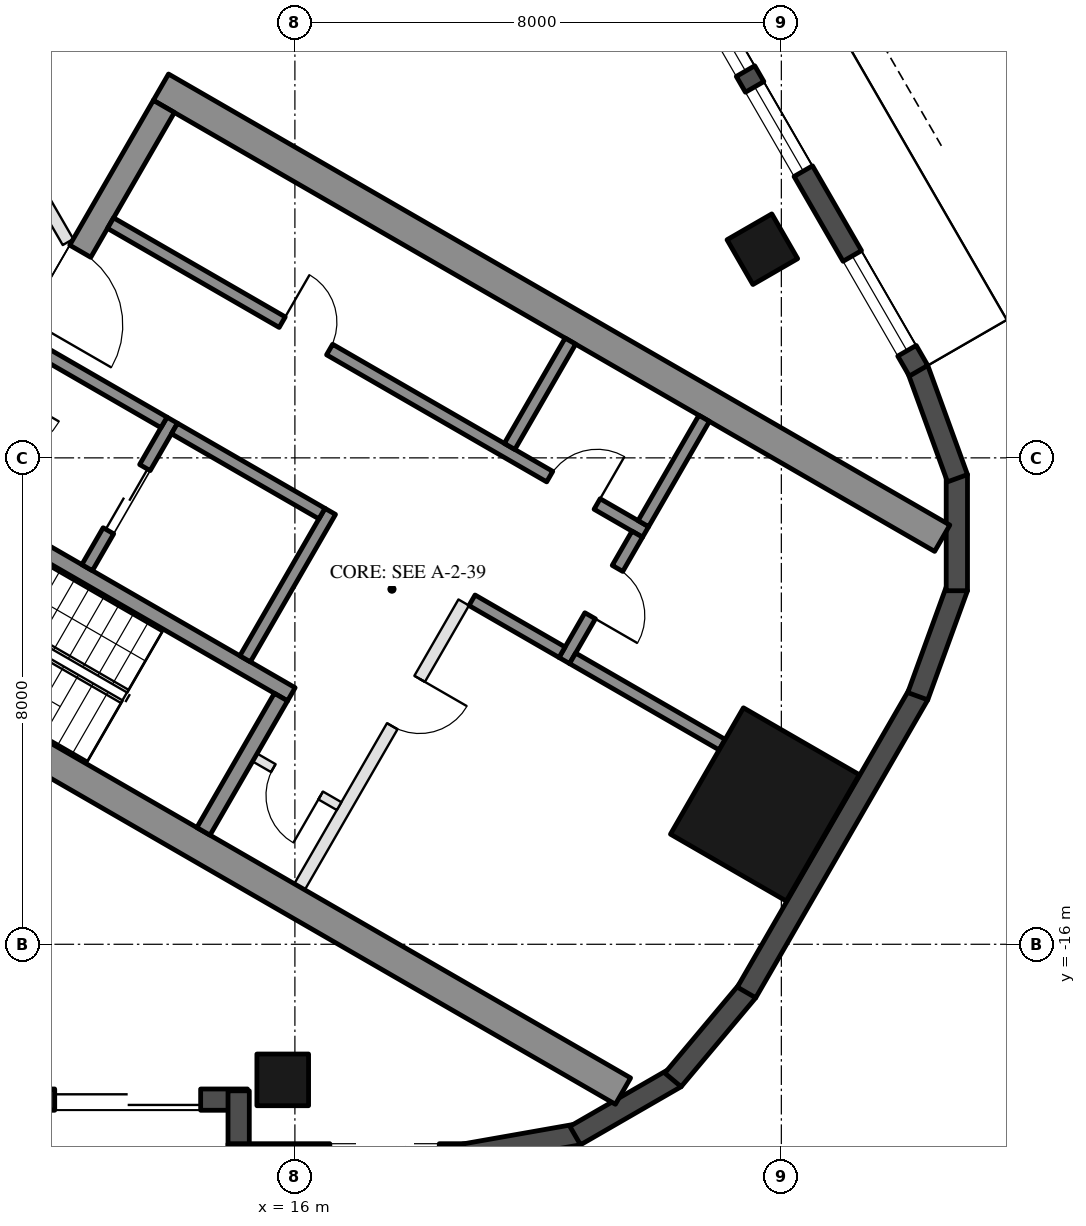
"""IFC4 building model, lengths in metres.
Left out: names, types, materials, properties, quantities, classifications, styles, units other than length and angle.
Written with IfcOpenShell. Run it as: python <this file> out.ifc"""

import sys

from ifc_helpers import new_model, si_unit, direction, frame, frame_2d, origin, origin_2d, place, context, subcontext, project, spatial, rectangle, hollow_rectangle, extrude, element, fill, save


model = new_model("IFC4")
c1 = context("Model", 3, precision=1e-05, world=origin(), true_north=direction((0.0, 1.0)))
c2 = subcontext(c1, "Body", "Model", "MODEL_VIEW")
j1 = project(units=[si_unit("LENGTHUNIT", "METRE"), si_unit("PLANEANGLEUNIT", "RADIAN")], contexts=[c1])
p1 = place(None, origin())
s1 = spatial("IfcSite", under=j1, at=p1, CompositionType="ELEMENT")
p2 = place(p1, origin())
s2 = spatial("IfcBuilding", under=s1, at=p2, CompositionType="ELEMENT")
p3 = place(p2, frame((0.0, 0.0, 168.8)))
s3 = spatial("IfcBuildingStorey", under=s2, at=p3, CompositionType="ELEMENT", Elevation=168.8)
for number, where, z_axis, x_axis in (
    (1, (15.8, -18.23, 0.0), (0.0, 0.0, 1.0), (-1.0, 0.0, 0.0)),
    (2, (23.688, -4.568, 0.0), (0.0, 0.0, 1.0), (-0.5, 0.866, 0.0)),
):
    element("IfcColumn", number, at=place(p3, frame(where, z_axis=z_axis, x_axis=x_axis)), inside=s3, PredefinedType="COLUMN", context=c2, shape_type="SweptSolid", body=[
        extrude(hollow_rectangle(XDim=0.85, YDim=0.85, WallThickness=0.04, at=origin_2d()), origin(), (0.0, 0.0, 1.0), 3.7),
    ])
p4 = place(p3, frame((23.729, -13.7, 0.0), z_axis=(0.0, 0.0, 1.0), x_axis=(0.5, 0.866025403784, 0.0)))
e3 = element("IfcColumn", 3, at=p4, inside=s3, PredefinedType="COLUMN", context=c2, shape_type="SweptSolid", body=[
    extrude(hollow_rectangle(XDim=2.4, YDim=2.2, WallThickness=0.06, at=origin_2d()), origin(), (0.0, 0.0, 1.0), 3.7),
])
p5 = place(p3, frame((8.48, -18.555, 0.0), z_axis=(0.0, 0.0, 1.0), x_axis=(1.0, 0.0, 0.0)))
e4 = element("IfcWall", 4, at=p5, inside=s3, PredefinedType="SOLIDWALL", context=c2, shape_type="SweptSolid", body=[
    extrude(rectangle(XDim=6.74, YDim=0.35, at=frame_2d((3.37, 0.0))), origin(), (0.0, 0.0, 1.0), 3.55),
])
p6 = place(p5, frame((3.57, 0.0, 0.0)))
e5 = element("IfcOpeningElement", 5, at=p6, cuts=e4, PredefinedType="OPENING", context=c2, shape_type="SweptSolid", body=[
    extrude(rectangle(XDim=2.4, YDim=2.4, at=frame_2d((1.2, 1.2))), frame((0.0, 0.185, 0.0), z_axis=(0.0, -1.0, 0.0), x_axis=(1.0, 0.0, 0.0)), (0.0, 0.0, 1.0), 0.37),
])
p7 = place(p5, frame((0.32, 0.0, 0.3)))
e6 = element("IfcOpeningElement", 6, at=p7, cuts=e4, PredefinedType="OPENING", context=c2, shape_type="SweptSolid", body=[
    extrude(rectangle(XDim=2.9, YDim=2.65, at=frame_2d((1.45, 1.325))), frame((0.0, 0.185, 0.0), z_axis=(0.0, -1.0, 0.0), x_axis=(1.0, 0.0, 0.0)), (0.0, 0.0, 1.0), 0.37),
])
p8 = place(p3, frame((15.075, -18.41, 0.0), z_axis=(0.0, 0.0, 1.0), x_axis=(0.0, -1.0, 0.0)))
e7 = element("IfcWall", 7, at=p8, inside=s3, PredefinedType="SOLIDWALL", context=c2, shape_type="SweptSolid", body=[
    extrude(rectangle(XDim=1.22, YDim=0.35, at=frame_2d((0.61, 0.0))), origin(), (0.0, 0.0, 1.0), 3.55),
])
p9 = place(p3, frame((14.9, -19.455, 0.0), z_axis=(0.0, 0.0, 1.0), x_axis=(1.0, 0.0, 0.0)))
e8 = element("IfcWall", 8, at=p9, inside=s3, PredefinedType="SOLIDWALL", context=c2, shape_type="SweptSolid", body=[
    extrude(rectangle(XDim=3.916, YDim=0.35, at=frame_2d((1.958, 0.0))), origin(), (0.0, 0.0, 1.0), 3.55),
])
p10 = place(p9, frame((1.675, 0.0, 0.3)))
e9 = element("IfcOpeningElement", 9, at=p10, cuts=e8, PredefinedType="OPENING", context=c2, shape_type="SweptSolid", body=[
    extrude(rectangle(XDim=1.8, YDim=2.65, at=frame_2d((0.9, 1.325))), frame((0.0, 0.185, 0.0), z_axis=(0.0, -1.0, 0.0), x_axis=(1.0, 0.0, 0.0)), (0.0, 0.0, 1.0), 0.37),
])
p11 = place(p3, frame((18.785, -19.458, 0.0), z_axis=(0.0, 0.0, 1.0), x_axis=(0.984798995425, 0.173697837091, 0.0)))
e10 = element("IfcWall", 10, at=p11, inside=s3, PredefinedType="SOLIDWALL", context=c2, shape_type="SweptSolid", body=[
    extrude(rectangle(XDim=1.91, YDim=0.35, at=frame_2d((0.955, 0.0))), origin(), (0.0, 0.0, 1.0), 3.55),
])
for number, where, z_axis, x_axis in (
    (11, (20.61, -19.147, 0.0), (0.0, 0.0, 1.0), (0.866, 0.5, 0.0)),
    (12, (22.217, -18.231, 0.0), (0.0, 0.0, 1.0), (0.643, 0.766, 0.0)),
):
    element("IfcWall", number, at=place(p3, frame(where, z_axis=z_axis, x_axis=x_axis)), inside=s3, PredefinedType="SOLIDWALL", context=c2, shape_type="SweptSolid", body=[
        extrude(rectangle(XDim=1.91, YDim=0.35, at=frame_2d((0.955, 0.0))), origin(), (0.0, 0.0, 1.0), 3.55),
    ])
p12 = place(p3, frame((23.427, -16.792, 0.0), z_axis=(0.0, 0.0, 1.0), x_axis=(0.500018773155, 0.866014564827, 0.0)))
e13 = element("IfcWall", 13, at=p12, inside=s3, PredefinedType="SOLIDWALL", context=c2, shape_type="SweptSolid", body=[
    extrude(rectangle(XDim=5.658, YDim=0.35, at=frame_2d((2.829, 0.0))), origin(), (0.0, 0.0, 1.0), 3.55),
])
for number, where, z_axis, x_axis in (
    (14, (26.244, -11.92, 0.0), (0.0, 0.0, 1.0), (0.342, 0.94, 0.0)),
    (15, (26.886, -10.185, 0.0), (0.0, 0.0, 1.0), (0.0, 1.0, 0.0)),
    (16, (26.897, -8.335, 0.0), (0.0, 0.0, 1.0), (-0.342, 0.94, 0.0)),
):
    element("IfcWall", number, at=place(p3, frame(where, z_axis=z_axis, x_axis=x_axis)), inside=s3, PredefinedType="SOLIDWALL", context=c2, shape_type="SweptSolid", body=[
        extrude(rectangle(XDim=1.91, YDim=0.35, at=frame_2d((0.955, 0.0))), origin(), (0.0, 0.0, 1.0), 3.55),
    ])
p13 = place(p3, frame((26.257, -6.567, 0.0), z_axis=(0.0, 0.0, 1.0), x_axis=(-0.500023526245, 0.866011820475, 0.0)))
e17 = element("IfcWall", 17, at=p13, inside=s3, PredefinedType="SOLIDWALL", context=c2, shape_type="SweptSolid", body=[
    extrude(rectangle(XDim=11.816, YDim=0.35, at=frame_2d((5.908, 0.0))), origin(), (0.0, 0.0, 1.0), 3.55),
])
p14 = place(p13, frame((0.38, 0.0, 0.3)))
e18 = element("IfcOpeningElement", 18, at=p14, cuts=e17, PredefinedType="OPENING", context=c2, shape_type="SweptSolid", body=[
    extrude(rectangle(XDim=1.8, YDim=2.65, at=frame_2d((0.9, 1.325))), frame((0.0, 0.185, 0.0), z_axis=(0.0, -1.0, 0.0), x_axis=(1.0, 0.0, 0.0)), (0.0, 0.0, 1.0), 0.37),
])
p15 = place(p13, frame((7.741, 0.0, 0.0)))
e19 = element("IfcOpeningElement", 19, at=p15, cuts=e17, PredefinedType="OPENING", context=c2, shape_type="SweptSolid", body=[
    extrude(rectangle(XDim=2.4, YDim=2.4, at=frame_2d((1.2, 1.2))), frame((0.0, 0.185, 0.0), z_axis=(0.0, -1.0, 0.0), x_axis=(1.0, 0.0, 0.0)), (0.0, 0.0, 1.0), 0.37),
])
p16 = place(p13, frame((3.791, 0.0, 0.3)))
e20 = element("IfcOpeningElement", 20, at=p16, cuts=e17, PredefinedType="OPENING", context=c2, shape_type="SweptSolid", body=[
    extrude(rectangle(XDim=1.6, YDim=2.65, at=frame_2d((0.8, 1.325))), frame((0.0, 0.185, 0.0), z_axis=(0.0, -1.0, 0.0), x_axis=(1.0, 0.0, 0.0)), (0.0, 0.0, 1.0), 0.37),
])
p17 = place(p13, frame((5.691, 0.0, 0.3)))
e21 = element("IfcOpeningElement", 21, at=p17, cuts=e17, PredefinedType="OPENING", context=c2, shape_type="SweptSolid", body=[
    extrude(rectangle(XDim=1.6, YDim=2.65, at=frame_2d((0.8, 1.325))), frame((0.0, 0.185, 0.0), z_axis=(0.0, -1.0, 0.0), x_axis=(1.0, 0.0, 0.0)), (0.0, 0.0, 1.0), 0.37),
])
for number, where, z_axis, x_axis in (
    (22, (8.547, -10.997, 0.0), (0.0, 0.0, 1.0), (0.866, -0.5, 0.0)),
    (23, (13.797, -1.903, 0.0), (0.0, 0.0, 1.0), (0.866, -0.5, 0.0)),
):
    element("IfcWall", number, at=place(p3, frame(where, z_axis=z_axis, x_axis=x_axis)), inside=s3, PredefinedType="SHEAR", context=c2, shape_type="SweptSolid", body=[
        extrude(rectangle(XDim=14.837, YDim=0.5, at=frame_2d((7.418, 0.0))), origin(), (0.0, 0.0, 1.0), 3.5),
    ])
p18 = place(p3, frame((8.845, -10.88, 0.0), z_axis=(0.0, 0.0, 1.0), x_axis=(0.500004234368, 0.866022959057, 0.0)))
e24 = element("IfcWall", 24, at=p18, inside=s3, PredefinedType="SHEAR", context=c2, shape_type="SweptSolid", body=[
    extrude(rectangle(XDim=10.0, YDim=0.4, at=frame_2d((5.0, 0.0))), origin(), (0.0, 0.0, 1.0), 3.5),
])
p19 = place(p18, frame((3.55, 0.0, 0.0)))
e25 = element("IfcOpeningElement", 25, at=p19, cuts=e24, PredefinedType="OPENING", context=c2, shape_type="SweptSolid", body=[
    extrude(rectangle(XDim=1.1, YDim=2.1, at=frame_2d((0.55, 1.05))), frame((0.0, 0.21, 0.0), z_axis=(0.0, -1.0, 0.0), x_axis=(1.0, 0.0, 0.0)), (0.0, 0.0, 1.0), 0.42),
])
p20 = place(p18, frame((5.85, 0.0, 0.0)))
e26 = element("IfcOpeningElement", 26, at=p20, cuts=e24, PredefinedType="OPENING", context=c2, shape_type="SweptSolid", body=[
    extrude(rectangle(XDim=1.4, YDim=2.1, at=frame_2d((0.7, 1.05))), frame((0.0, 0.21, 0.0), z_axis=(0.0, -1.0, 0.0), x_axis=(1.0, 0.0, 0.0)), (0.0, 0.0, 1.0), 0.42),
])
p21 = place(p3, frame((10.356, -8.664, 0.0), z_axis=(0.0, 0.0, 1.0), x_axis=(0.866028629588, -0.499994412703, 0.0)))
e27 = element("IfcWall", 27, at=p21, inside=s3, PredefinedType="SHEAR", context=c2, shape_type="SweptSolid", body=[
    extrude(rectangle(XDim=6.45, YDim=0.25, at=frame_2d((3.225, 0.0))), origin(), (0.0, 0.0, 1.0), 3.5),
])
p22 = place(p21, frame((0.3, 0.0, 0.0)))
e28 = element("IfcOpeningElement", 28, at=p22, cuts=e27, PredefinedType="OPENING", context=c2, shape_type="SweptSolid", body=[
    extrude(rectangle(XDim=1.0, YDim=2.1, at=frame_2d((0.5, 1.05))), frame((0.0, 0.135, 0.0), z_axis=(0.0, -1.0, 0.0), x_axis=(1.0, 0.0, 0.0)), (0.0, 0.0, 1.0), 0.27),
])
p23 = place(p3, frame((14.496, -14.143, 0.0), z_axis=(0.0, 0.0, 1.0), x_axis=(0.500062241894, 0.865989465428, 0.0)))
e29 = element("IfcWall", 29, at=p23, inside=s3, PredefinedType="SHEAR", context=c2, shape_type="SweptSolid", body=[
    extrude(rectangle(XDim=2.55, YDim=0.25, at=frame_2d((1.275, 0.0))), origin(), (0.0, 0.0, 1.0), 3.5),
])
p24 = place(p3, frame((15.181, -11.305, 0.0), z_axis=(0.0, 0.0, 1.0), x_axis=(0.49994636267, 0.866056369097, 0.0)))
e30 = element("IfcWall", 30, at=p24, inside=s3, PredefinedType="SHEAR", context=c2, shape_type="SweptSolid", body=[
    extrude(rectangle(XDim=2.8, YDim=0.2, at=frame_2d((1.4, 0.0))), origin(), (0.0, 0.0, 1.0), 3.5),
])
p25 = place(p3, frame((12.583, -9.805, 0.0), z_axis=(0.0, 0.0, 1.0), x_axis=(0.49994636267, 0.866056369097, 0.0)))
e31 = element("IfcWall", 31, at=p25, inside=s3, PredefinedType="SHEAR", context=c2, shape_type="SweptSolid", body=[
    extrude(rectangle(XDim=2.8, YDim=0.2, at=frame_2d((1.4, 0.0))), origin(), (0.0, 0.0, 1.0), 3.5),
])
p26 = place(p25, frame((0.7, 0.0, 0.0)))
e32 = element("IfcOpeningElement", 32, at=p26, cuts=e31, PredefinedType="OPENING", context=c2, shape_type="SweptSolid", body=[
    extrude(rectangle(XDim=1.2, YDim=2.1, at=frame_2d((0.6, 1.05))), frame((0.0, 0.11, 0.0), z_axis=(0.0, -1.0, 0.0), x_axis=(1.0, 0.0, 0.0)), (0.0, 0.0, 1.0), 0.22),
])
p27 = place(p3, frame((11.768, -6.217, 0.0), z_axis=(0.0, 0.0, 1.0), x_axis=(0.866050077142, -0.499957262057, 0.0)))
e33 = element("IfcWall", 33, at=p27, inside=s3, PredefinedType="SHEAR", context=c2, shape_type="SweptSolid", body=[
    extrude(rectangle(XDim=2.4, YDim=0.2, at=frame_2d((1.2, 0.0))), origin(), (0.0, 0.0, 1.0), 3.5),
])
p28 = place(p3, frame((14.02, -7.517, 0.0), z_axis=(0.0, 0.0, 1.0), x_axis=(0.866034573852, -0.49998411664, 0.0)))
e34 = element("IfcWall", 34, at=p28, inside=s3, PredefinedType="SHEAR", context=c2, shape_type="SweptSolid", body=[
    extrude(rectangle(XDim=2.8, YDim=0.2, at=frame_2d((1.4, 0.0))), origin(), (0.0, 0.0, 1.0), 3.5),
])
p29 = place(p3, frame((12.968, -4.138, 0.0), z_axis=(0.0, 0.0, 1.0), x_axis=(0.866028328073, -0.49999493495, 0.0)))
e35 = element("IfcWall", 35, at=p29, inside=s3, PredefinedType="SHEAR", context=c2, shape_type="SweptSolid", body=[
    extrude(rectangle(XDim=10.16, YDim=0.2, at=frame_2d((5.08, 0.0))), origin(), (0.0, 0.0, 1.0), 3.5),
])
p30 = place(p29, frame((3.26, 0.0, 0.0)))
e36 = element("IfcOpeningElement", 36, at=p30, cuts=e35, PredefinedType="OPENING", context=c2, shape_type="SweptSolid", body=[
    extrude(rectangle(XDim=0.9, YDim=2.1, at=frame_2d((0.45, 1.05))), frame((0.0, 0.11, 0.0), z_axis=(0.0, -1.0, 0.0), x_axis=(1.0, 0.0, 0.0)), (0.0, 0.0, 1.0), 0.22),
])
p31 = place(p29, frame((8.34, 0.0, 0.0)))
e37 = element("IfcOpeningElement", 37, at=p31, cuts=e35, PredefinedType="OPENING", context=c2, shape_type="SweptSolid", body=[
    extrude(rectangle(XDim=0.9, YDim=2.1, at=frame_2d((0.45, 1.05))), frame((0.0, 0.11, 0.0), z_axis=(0.0, -1.0, 0.0), x_axis=(1.0, 0.0, 0.0)), (0.0, 0.0, 1.0), 0.22),
])
p32 = place(p3, frame((20.43, -11.333, 0.0), z_axis=(0.0, 0.0, 1.0), x_axis=(0.500001309137, 0.866024647952, 0.0)))
e38 = element("IfcWall", 38, at=p32, inside=s3, PredefinedType="SHEAR", context=c2, shape_type="SweptSolid", body=[
    extrude(rectangle(XDim=2.4, YDim=0.2, at=frame_2d((1.2, 0.0))), origin(), (0.0, 0.0, 1.0), 3.5),
])
p33 = place(p32, frame((0.85, 0.0, 0.0)))
e39 = element("IfcOpeningElement", 39, at=p33, cuts=e38, PredefinedType="OPENING", context=c2, shape_type="SweptSolid", body=[
    extrude(rectangle(XDim=0.9, YDim=2.1, at=frame_2d((0.45, 1.05))), frame((0.0, 0.11, 0.0), z_axis=(0.0, -1.0, 0.0), x_axis=(1.0, 0.0, 0.0)), (0.0, 0.0, 1.0), 0.22),
])
p34 = place(p3, frame((18.913, -10.342, 0.0), z_axis=(0.0, 0.0, 1.0), x_axis=(0.866038183914, -0.499977863513, 0.0)))
e40 = element("IfcWall", 40, at=p34, inside=s3, PredefinedType="SHEAR", context=c2, shape_type="SweptSolid", body=[
    extrude(rectangle(XDim=1.71, YDim=0.2, at=frame_2d((0.855, 0.0))), origin(), (0.0, 0.0, 1.0), 3.5),
])
for number, where, z_axis, x_axis in (
    (41, (19.531, -7.812, 0.0), (0.0, 0.0, 1.0), (0.5, 0.866, 0.0)),
    (42, (21.73, -9.082, 0.0), (0.0, 0.0, 1.0), (0.5, 0.866, 0.0)),
):
    element("IfcWall", number, at=place(p3, frame(where, z_axis=z_axis, x_axis=x_axis)), inside=s3, PredefinedType="SHEAR", context=c2, shape_type="SweptSolid", body=[
        extrude(rectangle(XDim=2.0, YDim=0.2, at=frame_2d((1.0, 0.0))), origin(), (0.0, 0.0, 1.0), 3.5),
    ])
p35 = place(p3, frame((20.567, -11.297, 0.0), z_axis=(0.0, 0.0, 1.0), x_axis=(0.866055327414, -0.49994816717, 0.0)))
e43 = element("IfcWall", 43, at=p35, inside=s3, PredefinedType="SHEAR", context=c2, shape_type="SweptSolid", body=[
    extrude(rectangle(XDim=2.84, YDim=0.2, at=frame_2d((1.42, 0.0))), origin(), (0.0, 0.0, 1.0), 3.5),
])
p36 = place(p3, frame((16.076, -15.055, 0.0), z_axis=(0.0, 0.0, 1.0), x_axis=(0.499995103361, 0.866028230842, 0.0)))
e44 = element("IfcWall", 44, at=p36, inside=s3, PredefinedType="PARTITIONING", context=c2, shape_type="SweptSolid", body=[
    extrude(rectangle(XDim=5.4, YDim=0.2, at=frame_2d((2.7, 0.0))), origin(), (0.0, 0.0, 1.0), 3.5),
])
p37 = place(p36, frame((3.05, 0.0, 0.0)))
e45 = element("IfcOpeningElement", 45, at=p37, cuts=e44, PredefinedType="OPENING", context=c2, shape_type="SweptSolid", body=[
    extrude(rectangle(XDim=0.9, YDim=2.1, at=frame_2d((0.45, 1.05))), frame((0.0, 0.11, 0.0), z_axis=(0.0, -1.0, 0.0), x_axis=(1.0, 0.0, 0.0)), (0.0, 0.0, 1.0), 0.22),
])
p38 = place(p3, frame((15.342, -12.928, 0.0), z_axis=(0.0, 0.0, 1.0), x_axis=(0.865989903783, -0.500061482766, 0.0)))
e46 = element("IfcWall", 46, at=p38, inside=s3, PredefinedType="PARTITIONING", context=c2, shape_type="SweptSolid", body=[
    extrude(rectangle(XDim=1.6, YDim=0.15, at=frame_2d((0.8, 0.0))), origin(), (0.0, 0.0, 1.0), 3.5),
])
p39 = place(p38, frame((0.35, 0.0, 0.0)))
e47 = element("IfcOpeningElement", 47, at=p39, cuts=e46, PredefinedType="OPENING", context=c2, shape_type="SweptSolid", body=[
    extrude(rectangle(XDim=0.9, YDim=2.1, at=frame_2d((0.45, 1.05))), frame((0.0, 0.085, 0.0), z_axis=(0.0, -1.0, 0.0), x_axis=(1.0, 0.0, 0.0)), (0.0, 0.0, 1.0), 0.17),
])
p40 = place(p3, frame((9.931, -0.401, 0.0), z_axis=(0.0, 0.0, 1.0), x_axis=(0.5000418389, -0.866001246737, 0.0)))
e48 = element("IfcWall", 48, at=p40, inside=s3, PredefinedType="PARTITIONING", context=c2, shape_type="SweptSolid", body=[
    extrude(rectangle(XDim=4.676, YDim=0.2, at=frame_2d((2.338, 0.0))), origin(), (0.0, 0.0, 1.0), 2.95),
])
p41 = place(p40, frame((1.838, 0.0, 0.0)))
e49 = element("IfcOpeningElement", 49, at=p41, cuts=e48, PredefinedType="OPENING", context=c2, shape_type="SweptSolid", body=[
    extrude(rectangle(XDim=1.0, YDim=2.1, at=frame_2d((0.5, 1.05))), frame((0.0, 0.11, 0.0), z_axis=(0.0, -1.0, 0.0), x_axis=(1.0, 0.0, 0.0)), (0.0, 0.0, 1.0), 0.22),
])
p42 = place(p6, frame((2.4, 0.0, 0.0), z_axis=(0.0, 0.0, 1.0), x_axis=(-1.0, 0.0, 0.0)))
e50 = element("IfcDoor", 50, at=p42, inside=s3, OperationType="SLIDING_TO_LEFT", PredefinedType="DOOR", context=c2, shape_type="SweptSolid", body=[
    extrude(rectangle(XDim=2.4, YDim=2.4, at=frame_2d((1.2, 1.2))), frame((0.0, 0.025, 0.0), z_axis=(0.0, -1.0, 0.0), x_axis=(1.0, 0.0, 0.0)), (0.0, 0.0, 1.0), 0.05),
])
fill(e5, e50)
p43 = place(p14, origin())
e51 = element("IfcWindow", 51, at=p43, inside=s3, PartitioningType="SINGLE_PANEL", PredefinedType="WINDOW", context=c2, shape_type="SweptSolid", body=[
    extrude(rectangle(XDim=1.8, YDim=2.65, at=frame_2d((0.9, 1.325))), frame((0.0, 0.03, 0.0), z_axis=(0.0, -1.0, 0.0), x_axis=(1.0, 0.0, 0.0)), (0.0, 0.0, 1.0), 0.06),
])
fill(e18, e51)
p44 = place(p16, origin())
e52 = element("IfcWindow", 52, at=p44, inside=s3, PartitioningType="SINGLE_PANEL", PredefinedType="WINDOW", context=c2, shape_type="SweptSolid", body=[
    extrude(rectangle(XDim=1.6, YDim=2.65, at=frame_2d((0.8, 1.325))), frame((0.0, 0.03, 0.0), z_axis=(0.0, -1.0, 0.0), x_axis=(1.0, 0.0, 0.0)), (0.0, 0.0, 1.0), 0.06),
])
fill(e20, e52)
p45 = place(p17, origin())
e53 = element("IfcWindow", 53, at=p45, inside=s3, PartitioningType="SINGLE_PANEL", PredefinedType="WINDOW", context=c2, shape_type="SweptSolid", body=[
    extrude(rectangle(XDim=1.6, YDim=2.65, at=frame_2d((0.8, 1.325))), frame((0.0, 0.03, 0.0), z_axis=(0.0, -1.0, 0.0), x_axis=(1.0, 0.0, 0.0)), (0.0, 0.0, 1.0), 0.06),
])
fill(e21, e53)
p46 = place(p26, origin())
e54 = element("IfcDoor", 54, at=p46, inside=s3, OperationType="DOUBLE_DOOR_SLIDING", PredefinedType="DOOR", context=c2, shape_type="SweptSolid", body=[
    extrude(rectangle(XDim=1.2, YDim=2.1, at=frame_2d((0.6, 1.05))), frame((0.0, 0.025, 0.0), z_axis=(0.0, -1.0, 0.0), x_axis=(1.0, 0.0, 0.0)), (0.0, 0.0, 1.0), 0.05),
])
fill(e32, e54)
p47 = place(p39, frame((0.9, 0.0, 0.0), z_axis=(0.0, 0.0, 1.0), x_axis=(-1.0, 0.0, 0.0)))
e55 = element("IfcDoor", 55, at=p47, inside=s3, OperationType="SINGLE_SWING_LEFT", PredefinedType="DOOR", context=c2, shape_type="SweptSolid", body=[
    extrude(rectangle(XDim=0.9, YDim=2.1, at=frame_2d((0.45, 1.05))), frame((0.0, 0.025, 0.0), z_axis=(0.0, -1.0, 0.0), x_axis=(1.0, 0.0, 0.0)), (0.0, 0.0, 1.0), 0.05),
])
fill(e47, e55)
p48 = place(p30, origin())
e56 = element("IfcDoor", 56, at=p48, inside=s3, OperationType="SINGLE_SWING_LEFT", PredefinedType="DOOR", context=c2, shape_type="SweptSolid", body=[
    extrude(rectangle(XDim=0.9, YDim=2.1, at=frame_2d((0.45, 1.05))), frame((0.0, 0.025, 0.0), z_axis=(0.0, -1.0, 0.0), x_axis=(1.0, 0.0, 0.0)), (0.0, 0.0, 1.0), 0.05),
])
fill(e36, e56)
p49 = place(p31, origin())
e57 = element("IfcDoor", 57, at=p49, inside=s3, OperationType="SINGLE_SWING_RIGHT", PredefinedType="DOOR", context=c2, shape_type="SweptSolid", body=[
    extrude(rectangle(XDim=0.9, YDim=2.1, at=frame_2d((0.45, 1.05))), frame((0.0, 0.025, 0.0), z_axis=(0.0, -1.0, 0.0), x_axis=(1.0, 0.0, 0.0)), (0.0, 0.0, 1.0), 0.05),
])
fill(e37, e57)
p50 = place(p33, frame((0.9, 0.0, 0.0), z_axis=(0.0, 0.0, 1.0), x_axis=(-1.0, 0.0, 0.0)))
e58 = element("IfcDoor", 58, at=p50, inside=s3, OperationType="SINGLE_SWING_RIGHT", PredefinedType="DOOR", context=c2, shape_type="SweptSolid", body=[
    extrude(rectangle(XDim=0.9, YDim=2.1, at=frame_2d((0.45, 1.05))), frame((0.0, 0.025, 0.0), z_axis=(0.0, -1.0, 0.0), x_axis=(1.0, 0.0, 0.0)), (0.0, 0.0, 1.0), 0.05),
])
fill(e39, e58)
p51 = place(p37, frame((0.9, 0.0, 0.0), z_axis=(0.0, 0.0, 1.0), x_axis=(-1.0, 0.0, 0.0)))
e59 = element("IfcDoor", 59, at=p51, inside=s3, OperationType="SINGLE_SWING_LEFT", PredefinedType="DOOR", context=c2, shape_type="SweptSolid", body=[
    extrude(rectangle(XDim=0.9, YDim=2.1, at=frame_2d((0.45, 1.05))), frame((0.0, 0.025, 0.0), z_axis=(0.0, -1.0, 0.0), x_axis=(1.0, 0.0, 0.0)), (0.0, 0.0, 1.0), 0.05),
])
fill(e45, e59)
p52 = place(p20, frame((1.4, 0.0, 0.0), z_axis=(0.0, 0.0, 1.0), x_axis=(-1.0, 0.0, 0.0)))
e60 = element("IfcDoor", 60, at=p52, inside=s3, OperationType="DOUBLE_DOOR_SINGLE_SWING", PredefinedType="DOOR", context=c2, shape_type="SweptSolid", body=[
    extrude(rectangle(XDim=1.4, YDim=2.1, at=frame_2d((0.7, 1.05))), frame((0.0, 0.025, 0.0), z_axis=(0.0, -1.0, 0.0), x_axis=(1.0, 0.0, 0.0)), (0.0, 0.0, 1.0), 0.05),
])
fill(e26, e60)
save(model, sys.argv[1])
